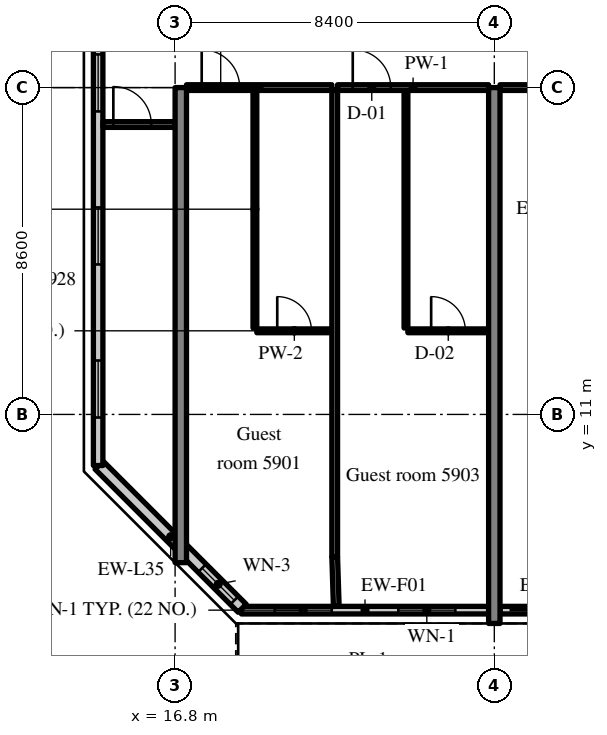
"""IFC4 building model, lengths in metres.
Left out: names, types, materials, properties, quantities, classifications, styles, units other than length and angle.
Written with IfcOpenShell. Run it as: python <this file> out.ifc"""

import sys

from ifc_helpers import new_model, si_unit, direction, frame, frame_2d, origin, place, context, subcontext, project, spatial, rectangle, extrude, source, transform, mapped, element, fill, save


model = new_model("IFC4")
c1 = context("Model", 3, precision=1e-05, world=origin(), true_north=direction((0.0, 1.0)))
c2 = subcontext(c1, "Body", "Model", "MODEL_VIEW")
j1 = project(units=[si_unit("LENGTHUNIT", "METRE"), si_unit("PLANEANGLEUNIT", "RADIAN")], contexts=[c1])
p1 = place(None, origin())
s1 = spatial("IfcSite", under=j1, at=p1, CompositionType="ELEMENT")
p2 = place(p1, origin())
s2 = spatial("IfcBuilding", under=s1, at=p2, CompositionType="ELEMENT")
p3 = place(p2, frame((0.0, 0.0, 245.2)))
s3 = spatial("IfcBuildingStorey", under=s2, at=p3, CompositionType="ELEMENT", Elevation=245.2)
m1 = source(origin(), c2, "Body", "SweptSolid", [
    extrude(rectangle(XDim=12.5, YDim=0.3, at=frame_2d((6.25, 0.0))), origin(), (0.0, 0.0, 1.0), 3.62),
])
p4 = place(p3, frame((16.95, 7.1, 0.0), z_axis=(0.0, 0.0, 1.0), x_axis=(0.0, 1.0, 0.0)))
e1 = element("IfcWall", 1, at=p4, inside=s3, PredefinedType="SHEAR", context=c2, shape_type="MappedRepresentation", body=[
    mapped(m1, transform((0.0, 0.0, 0.0), scale=1.0)),
])
m2 = source(origin(), c2, "Body", "SweptSolid", [
    extrude(rectangle(XDim=14.1, YDim=0.3, at=frame_2d((7.05, 0.0))), origin(), (0.0, 0.0, 1.0), 3.62),
])
p5 = place(p3, frame((25.2, 5.5, 0.0), z_axis=(0.0, 0.0, 1.0), x_axis=(0.0, 1.0, 0.0)))
e2 = element("IfcWall", 2, at=p5, inside=s3, PredefinedType="SHEAR", context=c2, shape_type="MappedRepresentation", body=[
    mapped(m2, transform((0.0, 0.0, 0.0), scale=1.0)),
])
m3 = source(origin(), c2, "Body", "SweptSolid", [
    extrude(rectangle(XDim=6.505, YDim=0.2, at=frame_2d((3.252, 0.0))), origin(), (0.0, 0.0, 1.0), 3.02),
])
p6 = place(p3, frame((18.545, 5.85, 0.0), z_axis=(0.0, 0.0, 1.0), x_axis=(1.0, 0.0, 0.0)))
e3 = element("IfcWall", 3, at=p6, inside=s3, PredefinedType="SOLIDWALL", context=c2, shape_type="MappedRepresentation", body=[
    mapped(m3, transform((0.0, 0.0, 0.0), scale=1.0)),
])
m4 = source(origin(), c2, "Body", "SweptSolid", [
    extrude(rectangle(XDim=1.5, YDim=1.5, at=frame_2d((0.75, 0.75))), frame((0.0, 0.11, 0.0), z_axis=(0.0, -1.0, 0.0), x_axis=(1.0, 0.0, 0.0)), (0.0, 0.0, 1.0), 0.22),
])
p7 = place(p6, frame((0.876, 0.0, 0.9)))
e4 = element("IfcOpeningElement", 4, at=p7, cuts=e3, PredefinedType="OPENING", context=c2, shape_type="MappedRepresentation", body=[
    mapped(m4, transform((0.0, 0.0, 0.0), scale=1.0)),
])
p8 = place(p6, frame((4.129, 0.0, 0.9)))
e5 = element("IfcOpeningElement", 5, at=p8, cuts=e3, PredefinedType="OPENING", context=c2, shape_type="MappedRepresentation", body=[
    mapped(m4, transform((0.0, 0.0, 0.0), scale=1.0)),
])
m5 = source(origin(), c2, "Body", "SweptSolid", [
    extrude(rectangle(XDim=8.1, YDim=0.2, at=frame_2d((4.05, 0.0))), origin(), (0.0, 0.0, 1.0), 3.02),
])
p9 = place(p3, frame((25.35, 5.85, 0.0), z_axis=(0.0, 0.0, 1.0), x_axis=(1.0, 0.0, 0.0)))
e6 = element("IfcWall", 6, at=p9, inside=s3, PredefinedType="SOLIDWALL", context=c2, shape_type="MappedRepresentation", body=[
    mapped(m5, transform((0.0, 0.0, 0.0), scale=1.0)),
])
m6 = source(origin(), c2, "Body", "SweptSolid", [
    extrude(rectangle(XDim=1.2, YDim=2.4, at=frame_2d((0.6, 1.2))), frame((0.0, 0.11, 0.0), z_axis=(0.0, -1.0, 0.0), x_axis=(1.0, 0.0, 0.0)), (0.0, 0.0, 1.0), 0.22),
])
p10 = place(p9, frame((0.25, 0.0, 0.0)))
e7 = element("IfcOpeningElement", 7, at=p10, cuts=e6, PredefinedType="OPENING", context=c2, shape_type="MappedRepresentation", body=[
    mapped(m6, transform((0.0, 0.0, 0.0), scale=1.0)),
])
p11 = place(p9, frame((2.3, 0.0, 0.9)))
e8 = element("IfcOpeningElement", 8, at=p11, cuts=e6, PredefinedType="OPENING", context=c2, shape_type="MappedRepresentation", body=[
    mapped(m4, transform((0.0, 0.0, 0.0), scale=1.0)),
])
p12 = place(p9, frame((4.3, 0.0, 0.0)))
e9 = element("IfcOpeningElement", 9, at=p12, cuts=e6, PredefinedType="OPENING", context=c2, shape_type="MappedRepresentation", body=[
    mapped(m6, transform((0.0, 0.0, 0.0), scale=1.0)),
])
p13 = place(p9, frame((6.35, 0.0, 0.9)))
e10 = element("IfcOpeningElement", 10, at=p13, cuts=e6, PredefinedType="OPENING", context=c2, shape_type="MappedRepresentation", body=[
    mapped(m4, transform((0.0, 0.0, 0.0), scale=1.0)),
])
m7 = source(origin(), c2, "Body", "SweptSolid", [
    extrude(rectangle(XDim=5.326, YDim=0.3, at=frame_2d((2.663, 0.0))), origin(), (0.0, 0.0, 1.0), 3.62),
])
p14 = place(p3, frame((14.8, 9.666, 0.0), z_axis=(0.0, 0.0, 1.0), x_axis=(0.707083859269, -0.707129702361, 0.0)))
e11 = element("IfcWall", 11, at=p14, inside=s3, PredefinedType="SOLIDWALL", context=c2, shape_type="MappedRepresentation", body=[
    mapped(m7, transform((0.0, 0.0, 0.0), scale=1.0)),
])
m8 = source(origin(), c2, "Body", "SweptSolid", [
    extrude(rectangle(XDim=1.2, YDim=1.5, at=frame_2d((0.6, 0.75))), frame((0.0, 0.16, 0.0), z_axis=(0.0, -1.0, 0.0), x_axis=(1.0, 0.0, 0.0)), (0.0, 0.0, 1.0), 0.32),
])
p15 = place(p14, frame((3.833, 0.0, 0.9)))
e12 = element("IfcOpeningElement", 12, at=p15, cuts=e11, PredefinedType="OPENING", context=c2, shape_type="MappedRepresentation", body=[
    mapped(m8, transform((0.0, 0.0, 0.0), scale=1.0)),
])
m9 = source(origin(), c2, "Body", "SweptSolid", [
    extrude(rectangle(XDim=28.189, YDim=0.25, at=frame_2d((14.095, 0.0))), origin(), (0.0, 0.0, 1.0), 3.62),
])
p16 = place(p3, frame((14.775, 37.845, 0.0), z_axis=(0.0, 0.0, 1.0), x_axis=(0.0, -1.0, 0.0)))
e13 = element("IfcWall", 13, at=p16, inside=s3, PredefinedType="SOLIDWALL", context=c2, shape_type="MappedRepresentation", body=[
    mapped(m9, transform((0.0, 0.0, 0.0), scale=1.0)),
])
m10 = source(origin(), c2, "Body", "SweptSolid", [
    extrude(rectangle(XDim=1.5, YDim=1.5, at=frame_2d((0.75, 0.75))), frame((0.0, 0.135, 0.0), z_axis=(0.0, -1.0, 0.0), x_axis=(1.0, 0.0, 0.0)), (0.0, 0.0, 1.0), 0.27),
])
p17 = place(p16, frame((1.263, 0.0, 0.9)))
e14 = element("IfcOpeningElement", 14, at=p17, cuts=e13, PredefinedType="OPENING", context=c2, shape_type="MappedRepresentation", body=[
    mapped(m10, transform((0.0, 0.0, 0.0), scale=1.0)),
])
p18 = place(p16, frame((5.291, 0.0, 0.9)))
e15 = element("IfcOpeningElement", 15, at=p18, cuts=e13, PredefinedType="OPENING", context=c2, shape_type="MappedRepresentation", body=[
    mapped(m10, transform((0.0, 0.0, 0.0), scale=1.0)),
])
p19 = place(p16, frame((9.318, 0.0, 0.9)))
e16 = element("IfcOpeningElement", 16, at=p19, cuts=e13, PredefinedType="OPENING", context=c2, shape_type="MappedRepresentation", body=[
    mapped(m10, transform((0.0, 0.0, 0.0), scale=1.0)),
])
p20 = place(p16, frame((13.345, 0.0, 0.9)))
e17 = element("IfcOpeningElement", 17, at=p20, cuts=e13, PredefinedType="OPENING", context=c2, shape_type="MappedRepresentation", body=[
    mapped(m10, transform((0.0, 0.0, 0.0), scale=1.0)),
])
p21 = place(p16, frame((17.372, 0.0, 0.9)))
e18 = element("IfcOpeningElement", 18, at=p21, cuts=e13, PredefinedType="OPENING", context=c2, shape_type="MappedRepresentation", body=[
    mapped(m10, transform((0.0, 0.0, 0.0), scale=1.0)),
])
p22 = place(p16, frame((21.399, 0.0, 0.9)))
e19 = element("IfcOpeningElement", 19, at=p22, cuts=e13, PredefinedType="OPENING", context=c2, shape_type="MappedRepresentation", body=[
    mapped(m10, transform((0.0, 0.0, 0.0), scale=1.0)),
])
p23 = place(p16, frame((25.426, 0.0, 0.9)))
e20 = element("IfcOpeningElement", 20, at=p23, cuts=e13, PredefinedType="OPENING", context=c2, shape_type="MappedRepresentation", body=[
    mapped(m10, transform((0.0, 0.0, 0.0), scale=1.0)),
])
m11 = source(origin(), c2, "Body", "SweptSolid", [
    extrude(rectangle(XDim=6.25, YDim=0.1, at=frame_2d((3.125, 0.0))), origin(), (0.0, 0.0, 1.0), 3.62),
])
p24 = place(p3, frame((18.9, 13.275, 0.0), z_axis=(0.0, 0.0, 1.0), x_axis=(0.0, 1.0, 0.0)))
e21 = element("IfcWall", 21, at=p24, inside=s3, PredefinedType="PARTITIONING", context=c2, shape_type="MappedRepresentation", body=[
    mapped(m11, transform((0.0, 0.0, 0.0), scale=1.0)),
])
m12 = source(origin(), c2, "Body", "SweptSolid", [
    extrude(rectangle(XDim=1.975, YDim=0.1, at=frame_2d((0.988, 0.0))), origin(), (0.0, 0.0, 1.0), 3.62),
])
p25 = place(p3, frame((18.95, 13.2, 0.0), z_axis=(0.0, 0.0, 1.0), x_axis=(1.0, 0.0, 0.0)))
e22 = element("IfcWall", 22, at=p25, inside=s3, PredefinedType="PARTITIONING", context=c2, shape_type="MappedRepresentation", body=[
    mapped(m12, transform((0.0, 0.0, 0.0), scale=1.0)),
])
m13 = source(origin(), c2, "Body", "SweptSolid", [
    extrude(rectangle(XDim=0.9, YDim=2.1, at=frame_2d((0.45, 1.05))), frame((0.0, 0.06, 0.0), z_axis=(0.0, -1.0, 0.0), x_axis=(1.0, 0.0, 0.0)), (0.0, 0.0, 1.0), 0.12),
])
p26 = place(p25, frame((0.538, 0.0, 0.0)))
e23 = element("IfcOpeningElement", 23, at=p26, cuts=e22, PredefinedType="OPENING", context=c2, shape_type="MappedRepresentation", body=[
    mapped(m13, transform((0.0, 0.0, 0.0), scale=1.0)),
])
m14 = source(origin(), c2, "Body", "SweptSolid", [
    extrude(rectangle(XDim=3.825, YDim=0.15, at=frame_2d((1.913, 0.0))), origin(), (0.0, 0.0, 1.0), 2.92),
])
p27 = place(p3, frame((17.1, 19.6, 0.0), z_axis=(0.0, 0.0, 1.0), x_axis=(1.0, 0.0, 0.0)))
e24 = element("IfcWall", 24, at=p27, inside=s3, PredefinedType="PARTITIONING", context=c2, shape_type="MappedRepresentation", body=[
    mapped(m14, transform((0.0, 0.0, 0.0), scale=1.0)),
])
m15 = source(origin(), c2, "Body", "SweptSolid", [
    extrude(rectangle(XDim=1.0, YDim=2.1, at=frame_2d((0.5, 1.05))), frame((0.0, 0.085, 0.0), z_axis=(0.0, -1.0, 0.0), x_axis=(1.0, 0.0, 0.0)), (0.0, 0.0, 1.0), 0.17),
])
p28 = place(p27, frame((0.4, 0.0, 0.0)))
e25 = element("IfcOpeningElement", 25, at=p28, cuts=e24, PredefinedType="OPENING", context=c2, shape_type="MappedRepresentation", body=[
    mapped(m15, transform((0.0, 0.0, 0.0), scale=1.0)),
])
p29 = place(p3, frame((22.875, 13.275, 0.0), z_axis=(0.0, 0.0, 1.0), x_axis=(0.0, 1.0, 0.0)))
e26 = element("IfcWall", 26, at=p29, inside=s3, PredefinedType="PARTITIONING", context=c2, shape_type="MappedRepresentation", body=[
    mapped(m11, transform((0.0, 0.0, 0.0), scale=1.0)),
])
m16 = source(origin(), c2, "Body", "SweptSolid", [
    extrude(rectangle(XDim=2.125, YDim=0.1, at=frame_2d((1.062, 0.0))), origin(), (0.0, 0.0, 1.0), 3.62),
])
p30 = place(p3, frame((22.925, 13.2, 0.0), z_axis=(0.0, 0.0, 1.0), x_axis=(1.0, 0.0, 0.0)))
e27 = element("IfcWall", 27, at=p30, inside=s3, PredefinedType="PARTITIONING", context=c2, shape_type="MappedRepresentation", body=[
    mapped(m16, transform((0.0, 0.0, 0.0), scale=1.0)),
])
p31 = place(p30, frame((0.613, 0.0, 0.0)))
e28 = element("IfcOpeningElement", 28, at=p31, cuts=e27, PredefinedType="OPENING", context=c2, shape_type="MappedRepresentation", body=[
    mapped(m13, transform((0.0, 0.0, 0.0), scale=1.0)),
])
m17 = source(origin(), c2, "Body", "SweptSolid", [
    extrude(rectangle(XDim=3.975, YDim=0.15, at=frame_2d((1.988, 0.0))), origin(), (0.0, 0.0, 1.0), 2.92),
])
p32 = place(p3, frame((21.075, 19.6, 0.0), z_axis=(0.0, 0.0, 1.0), x_axis=(1.0, 0.0, 0.0)))
e29 = element("IfcWall", 29, at=p32, inside=s3, PredefinedType="PARTITIONING", context=c2, shape_type="MappedRepresentation", body=[
    mapped(m17, transform((0.0, 0.0, 0.0), scale=1.0)),
])
p33 = place(p32, frame((0.4, 0.0, 0.0)))
e30 = element("IfcOpeningElement", 30, at=p33, cuts=e29, PredefinedType="OPENING", context=c2, shape_type="MappedRepresentation", body=[
    mapped(m15, transform((0.0, 0.0, 0.0), scale=1.0)),
])
m18 = source(origin(), c2, "Body", "SweptSolid", [
    extrude(rectangle(XDim=12.275, YDim=0.15, at=frame_2d((6.137, 0.0))), origin(), (0.0, 0.0, 1.0), 3.62),
])
p34 = place(p3, frame((21.0, 7.25, 0.0), z_axis=(0.0, 0.0, 1.0), x_axis=(0.0, 1.0, 0.0)))
e31 = element("IfcWall", 31, at=p34, inside=s3, PredefinedType="PARTITIONING", context=c2, shape_type="MappedRepresentation", body=[
    mapped(m18, transform((0.0, 0.0, 0.0), scale=1.0)),
])
m19 = source(origin(), c2, "Body", "SweptSolid", [
    extrude(rectangle(XDim=3.975, YDim=0.15, at=frame_2d((1.987, 0.0))), origin(), (0.0, 0.0, 1.0), 2.92),
])
p35 = place(p3, frame((25.35, 19.6, 0.0), z_axis=(0.0, 0.0, 1.0), x_axis=(1.0, 0.0, 0.0)))
e32 = element("IfcWall", 32, at=p35, inside=s3, PredefinedType="PARTITIONING", context=c2, shape_type="MappedRepresentation", body=[
    mapped(m19, transform((0.0, 0.0, 0.0), scale=1.0)),
])
p36 = place(p35, frame((1.487, 0.0, 0.0)))
e33 = element("IfcOpeningElement", 33, at=p36, cuts=e32, PredefinedType="OPENING", context=c2, shape_type="MappedRepresentation", body=[
    mapped(m15, transform((0.0, 0.0, 0.0), scale=1.0)),
])
m20 = source(origin(), c2, "Body", "SweptSolid", [
    extrude(rectangle(XDim=1.9, YDim=0.15, at=frame_2d((0.95, 0.0))), origin(), (0.0, 0.0, 1.0), 2.92),
])
p37 = place(p3, frame((14.9, 18.628, 0.0), z_axis=(0.0, 0.0, 1.0), x_axis=(1.0, 0.0, 0.0)))
e34 = element("IfcWall", 34, at=p37, inside=s3, PredefinedType="PARTITIONING", context=c2, shape_type="MappedRepresentation", body=[
    mapped(m20, transform((0.0, 0.0, 0.0), scale=1.0)),
])
p38 = place(p37, frame((0.275, 0.0, 0.0)))
e35 = element("IfcOpeningElement", 35, at=p38, cuts=e34, PredefinedType="OPENING", context=c2, shape_type="MappedRepresentation", body=[
    mapped(m15, transform((0.0, 0.0, 0.0), scale=1.0)),
])
m21 = source(origin(), c2, "Body", "SweptSolid", [
    extrude(rectangle(XDim=1.301, YDim=0.15, at=frame_2d((0.65, 0.0))), origin(), (0.0, 0.0, 1.0), 3.62),
])
p39 = place(p3, frame((21.041, 5.95, 0.0), z_axis=(0.0, 0.0, 1.0), x_axis=(-0.031533606063, 0.999502692187, 0.0)))
e36 = element("IfcWall", 36, at=p39, inside=s3, PredefinedType="PARTITIONING", context=c2, shape_type="MappedRepresentation", body=[
    mapped(m21, transform((0.0, 0.0, 0.0), scale=1.0)),
])
m22 = source(origin(), c2, "Body", "SweptSolid", [
    extrude(rectangle(XDim=1.5, YDim=1.5, at=frame_2d((0.75, 0.75))), frame((0.0, 0.03, 0.0), z_axis=(0.0, -1.0, 0.0), x_axis=(1.0, 0.0, 0.0)), (0.0, 0.0, 1.0), 0.06),
])
p40 = place(p7, origin())
e37 = element("IfcWindow", 37, at=p40, inside=s3, PartitioningType="SINGLE_PANEL", PredefinedType="WINDOW", context=c2, shape_type="MappedRepresentation", body=[
    mapped(m22, transform((0.0, 0.0, 0.0), scale=1.0)),
])
fill(e4, e37)
p41 = place(p8, origin())
e38 = element("IfcWindow", 38, at=p41, inside=s3, PartitioningType="SINGLE_PANEL", PredefinedType="WINDOW", context=c2, shape_type="MappedRepresentation", body=[
    mapped(m22, transform((0.0, 0.0, 0.0), scale=1.0)),
])
fill(e5, e38)
m23 = source(origin(), c2, "Body", "SweptSolid", [
    extrude(rectangle(XDim=1.2, YDim=2.4, at=frame_2d((0.6, 1.2))), frame((0.0, 0.025, 0.0), z_axis=(0.0, -1.0, 0.0), x_axis=(1.0, 0.0, 0.0)), (0.0, 0.0, 1.0), 0.05),
])
p42 = place(p10, origin())
e39 = element("IfcDoor", 39, at=p42, inside=s3, OperationType="SLIDING_TO_LEFT", PredefinedType="DOOR", context=c2, shape_type="MappedRepresentation", body=[
    mapped(m23, transform((0.0, 0.0, 0.0), scale=1.0)),
])
fill(e7, e39)
m24 = source(origin(), c2, "Body", "SweptSolid", [
    extrude(rectangle(XDim=1.2, YDim=1.5, at=frame_2d((0.6, 0.75))), frame((0.0, 0.03, 0.0), z_axis=(0.0, -1.0, 0.0), x_axis=(1.0, 0.0, 0.0)), (0.0, 0.0, 1.0), 0.06),
])
p43 = place(p15, origin())
e40 = element("IfcWindow", 40, at=p43, inside=s3, PartitioningType="SINGLE_PANEL", PredefinedType="WINDOW", context=c2, shape_type="MappedRepresentation", body=[
    mapped(m24, transform((0.0, 0.0, 0.0), scale=1.0)),
])
fill(e12, e40)
p44 = place(p21, origin())
e41 = element("IfcWindow", 41, at=p44, inside=s3, PartitioningType="SINGLE_PANEL", PredefinedType="WINDOW", context=c2, shape_type="MappedRepresentation", body=[
    mapped(m22, transform((0.0, 0.0, 0.0), scale=1.0)),
])
fill(e18, e41)
p45 = place(p22, origin())
e42 = element("IfcWindow", 42, at=p45, inside=s3, PartitioningType="SINGLE_PANEL", PredefinedType="WINDOW", context=c2, shape_type="MappedRepresentation", body=[
    mapped(m22, transform((0.0, 0.0, 0.0), scale=1.0)),
])
fill(e19, e42)
p46 = place(p23, origin())
e43 = element("IfcWindow", 43, at=p46, inside=s3, PartitioningType="SINGLE_PANEL", PredefinedType="WINDOW", context=c2, shape_type="MappedRepresentation", body=[
    mapped(m22, transform((0.0, 0.0, 0.0), scale=1.0)),
])
fill(e20, e43)
m25 = source(origin(), c2, "Body", "SweptSolid", [
    extrude(rectangle(XDim=0.9, YDim=2.1, at=frame_2d((0.45, 1.05))), frame((0.0, 0.025, 0.0), z_axis=(0.0, -1.0, 0.0), x_axis=(1.0, 0.0, 0.0)), (0.0, 0.0, 1.0), 0.05),
])
p47 = place(p26, origin())
e44 = element("IfcDoor", 44, at=p47, inside=s3, OperationType="SINGLE_SWING_LEFT", PredefinedType="DOOR", context=c2, shape_type="MappedRepresentation", body=[
    mapped(m25, transform((0.0, 0.0, 0.0), scale=1.0)),
])
fill(e23, e44)
m26 = source(origin(), c2, "Body", "SweptSolid", [
    extrude(rectangle(XDim=1.0, YDim=2.1, at=frame_2d((0.5, 1.05))), frame((0.0, 0.025, 0.0), z_axis=(0.0, -1.0, 0.0), x_axis=(1.0, 0.0, 0.0)), (0.0, 0.0, 1.0), 0.05),
])
p48 = place(p28, origin())
e45 = element("IfcDoor", 45, at=p48, inside=s3, OperationType="SINGLE_SWING_LEFT", PredefinedType="DOOR", context=c2, shape_type="MappedRepresentation", body=[
    mapped(m26, transform((0.0, 0.0, 0.0), scale=1.0)),
])
fill(e25, e45)
p49 = place(p31, origin())
e46 = element("IfcDoor", 46, at=p49, inside=s3, OperationType="SINGLE_SWING_LEFT", PredefinedType="DOOR", context=c2, shape_type="MappedRepresentation", body=[
    mapped(m25, transform((0.0, 0.0, 0.0), scale=1.0)),
])
fill(e28, e46)
p50 = place(p33, origin())
e47 = element("IfcDoor", 47, at=p50, inside=s3, OperationType="SINGLE_SWING_LEFT", PredefinedType="DOOR", context=c2, shape_type="MappedRepresentation", body=[
    mapped(m26, transform((0.0, 0.0, 0.0), scale=1.0)),
])
fill(e30, e47)
p51 = place(p38, origin())
e48 = element("IfcDoor", 48, at=p51, inside=s3, OperationType="SINGLE_SWING_LEFT", PredefinedType="DOOR", context=c2, shape_type="MappedRepresentation", body=[
    mapped(m26, transform((0.0, 0.0, 0.0), scale=1.0)),
])
fill(e35, e48)
save(model, sys.argv[1])
